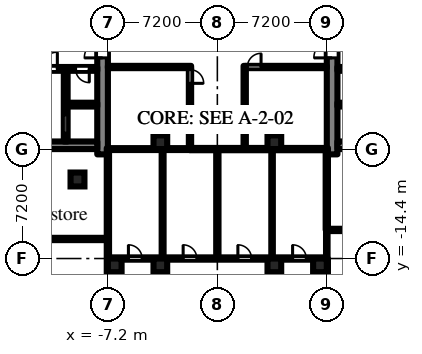
"""IFC4 building model, lengths in metres.
Left out: names, types, materials, properties, quantities, classifications, styles, units other than length and angle.
Written with IfcOpenShell. Run it as: python <this file> out.ifc"""

import sys

from ifc_helpers import new_model, si_unit, direction, frame, frame_2d, origin, origin_2d, place, context, subcontext, project, spatial, rectangle, hollow_circle, extrude, element, fill, save


model = new_model("IFC4")
c1 = context("Model", 3, precision=1e-05, world=origin(), true_north=direction((0.0, 1.0)))
c2 = subcontext(c1, "Body", "Model", "MODEL_VIEW")
j1 = project(units=[si_unit("LENGTHUNIT", "METRE"), si_unit("PLANEANGLEUNIT", "RADIAN")], contexts=[c1])
p1 = place(None, origin())
s1 = spatial("IfcSite", under=j1, at=p1, CompositionType="ELEMENT")
p2 = place(p1, origin())
s2 = spatial("IfcBuilding", under=s1, at=p2, CompositionType="ELEMENT")
p3 = place(p2, origin())
s3 = spatial("IfcBuildingStorey", under=s2, at=p3, CompositionType="ELEMENT", Elevation=0.0)
for number, where, z_axis, x_axis in (
    (1, (-6.75, -14.85, 0.0), (0.0, 0.0, 1.0), (1.0, 0.0, 0.0)),
    (2, (-3.75, -14.85, 0.0), (0.0, 0.0, 1.0), (1.0, 0.0, 0.0)),
    (3, (-3.75, -6.75, 0.0), (0.0, 0.0, 1.0), (1.0, 0.0, 0.0)),
    (4, (3.75, -14.85, 0.0), (0.0, 0.0, 1.0), (1.0, 0.0, 0.0)),
    (5, (3.75, -6.75, 0.0), (0.0, 0.0, 1.0), (1.0, 0.0, 0.0)),
    (6, (6.75, -14.85, 0.0), (0.0, 0.0, 1.0), (1.0, 0.0, 0.0)),
):
    element("IfcColumn", number, at=place(p3, frame(where, z_axis=z_axis, x_axis=x_axis)), inside=s3, PredefinedType="COLUMN", context=c2, shape_type="SweptSolid", body=[
        extrude(rectangle(XDim=0.9, YDim=0.9, at=origin_2d()), origin(), (0.0, 0.0, 1.0), 7.2),
    ])
p4 = place(p3, frame((-9.2, -9.2, 0.0), z_axis=(0.0, 0.0, 1.0), x_axis=(1.0, 0.0, 0.0)))
e7 = element("IfcColumn", 7, at=p4, inside=s3, PredefinedType="COLUMN", context=c2, shape_type="SweptSolid", body=[
    extrude(hollow_circle(Radius=0.457, WallThickness=0.05, at=origin_2d()), origin(), (0.0, 0.0, 1.0), 7.5),
])
p5 = place(p3, frame((7.55, -7.548, 0.0), z_axis=(0.0, 0.0, 1.0), x_axis=(0.0, 1.0, 0.0)))
e8 = element("IfcWall", 8, at=p5, inside=s3, PredefinedType="SHEAR", context=c2, shape_type="SweptSolid", body=[
    extrude(rectangle(XDim=15.096, YDim=0.7, at=frame_2d((7.548, 0.0))), origin(), (0.0, 0.0, 1.0), 6.6),
])
p6 = place(p5, frame((6.348, 0.0, 0.0)))
e9 = element("IfcOpeningElement", 9, at=p6, cuts=e8, PredefinedType="OPENING", context=c2, shape_type="SweptSolid", body=[
    extrude(rectangle(XDim=2.4, YDim=2.2, at=frame_2d((1.2, 1.1))), frame((0.0, 0.36, 0.0), z_axis=(0.0, -1.0, 0.0), x_axis=(1.0, 0.0, 0.0)), (0.0, 0.0, 1.0), 0.72),
])
p7 = place(p3, frame((7.9, -6.95, 0.0), z_axis=(0.0, 0.0, 1.0), x_axis=(1.0, 0.0, 0.0)))
e10 = element("IfcWall", 10, at=p7, inside=s3, PredefinedType="SHEAR", context=c2, shape_type="SweptSolid", body=[
    extrude(rectangle(XDim=12.95, YDim=0.5, at=frame_2d((6.475, 0.0))), origin(), (0.0, 0.0, 1.0), 6.6),
])
p8 = place(p7, frame((5.35, 0.0, 0.0)))
e11 = element("IfcOpeningElement", 11, at=p8, cuts=e10, PredefinedType="OPENING", context=c2, shape_type="SweptSolid", body=[
    extrude(rectangle(XDim=1.1, YDim=2.1, at=frame_2d((0.55, 1.05))), frame((0.0, 0.26, 0.0), z_axis=(0.0, -1.0, 0.0), x_axis=(1.0, 0.0, 0.0)), (0.0, 0.0, 1.0), 0.52),
])
p9 = place(p3, frame((7.9, -1.925, 0.0), z_axis=(0.0, 0.0, 1.0), x_axis=(1.0, 0.0, 0.0)))
e12 = element("IfcWall", 12, at=p9, inside=s3, PredefinedType="SHEAR", context=c2, shape_type="SweptSolid", body=[
    extrude(rectangle(XDim=12.95, YDim=0.25, at=frame_2d((6.475, 0.0))), origin(), (0.0, 0.0, 1.0), 6.6),
])
p10 = place(p9, frame((4.825, 0.0, 0.0)))
e13 = element("IfcOpeningElement", 13, at=p10, cuts=e12, PredefinedType="OPENING", context=c2, shape_type="SweptSolid", body=[
    extrude(rectangle(XDim=1.1, YDim=2.1, at=frame_2d((0.55, 1.05))), frame((0.0, 0.135, 0.0), z_axis=(0.0, -1.0, 0.0), x_axis=(1.0, 0.0, 0.0)), (0.0, 0.0, 1.0), 0.27),
])
p11 = place(p9, frame((7.025, 0.0, 0.0)))
e14 = element("IfcOpeningElement", 14, at=p11, cuts=e12, PredefinedType="OPENING", context=c2, shape_type="SweptSolid", body=[
    extrude(rectangle(XDim=1.1, YDim=2.1, at=frame_2d((0.55, 1.05))), frame((0.0, 0.135, 0.0), z_axis=(0.0, -1.0, 0.0), x_axis=(1.0, 0.0, 0.0)), (0.0, 0.0, 1.0), 0.27),
])
p12 = place(p9, frame((9.225, 0.0, 0.0)))
e15 = element("IfcOpeningElement", 15, at=p12, cuts=e12, PredefinedType="OPENING", context=c2, shape_type="SweptSolid", body=[
    extrude(rectangle(XDim=1.1, YDim=2.1, at=frame_2d((0.55, 1.05))), frame((0.0, 0.135, 0.0), z_axis=(0.0, -1.0, 0.0), x_axis=(1.0, 0.0, 0.0)), (0.0, 0.0, 1.0), 0.27),
])
p13 = place(p9, frame((11.425, 0.0, 0.0)))
e16 = element("IfcOpeningElement", 16, at=p13, cuts=e12, PredefinedType="OPENING", context=c2, shape_type="SweptSolid", body=[
    extrude(rectangle(XDim=1.1, YDim=2.1, at=frame_2d((0.55, 1.05))), frame((0.0, 0.135, 0.0), z_axis=(0.0, -1.0, 0.0), x_axis=(1.0, 0.0, 0.0)), (0.0, 0.0, 1.0), 0.27),
])
p14 = place(p9, frame((0.525, 0.0, 0.0)))
e17 = element("IfcOpeningElement", 17, at=p14, cuts=e12, PredefinedType="OPENING", context=c2, shape_type="SweptSolid", body=[
    extrude(rectangle(XDim=0.9, YDim=2.1, at=frame_2d((0.45, 1.05))), frame((0.0, 0.135, 0.0), z_axis=(0.0, -1.0, 0.0), x_axis=(1.0, 0.0, 0.0)), (0.0, 0.0, 1.0), 0.27),
])
p15 = place(p9, frame((2.625, 0.0, 0.0)))
e18 = element("IfcOpeningElement", 18, at=p15, cuts=e12, PredefinedType="OPENING", context=c2, shape_type="SweptSolid", body=[
    extrude(rectangle(XDim=1.1, YDim=2.1, at=frame_2d((0.55, 1.05))), frame((0.0, 0.135, 0.0), z_axis=(0.0, -1.0, 0.0), x_axis=(1.0, 0.0, 0.0)), (0.0, 0.0, 1.0), 0.27),
])
p16 = place(p3, frame((7.9, -4.275, 0.0), z_axis=(0.0, 0.0, 1.0), x_axis=(1.0, 0.0, 0.0)))
e19 = element("IfcWall", 19, at=p16, inside=s3, PredefinedType="SHEAR", context=c2, shape_type="SweptSolid", body=[
    extrude(rectangle(XDim=1.95, YDim=0.25, at=frame_2d((0.975, 0.0))), origin(), (0.0, 0.0, 1.0), 6.6),
])
p17 = place(p3, frame((-7.55, -7.548, 0.0), z_axis=(0.0, 0.0, 1.0), x_axis=(0.0, 1.0, 0.0)))
e20 = element("IfcWall", 20, at=p17, inside=s3, PredefinedType="SHEAR", context=c2, shape_type="SweptSolid", body=[
    extrude(rectangle(XDim=15.096, YDim=0.7, at=frame_2d((7.548, 0.0))), origin(), (0.0, 0.0, 1.0), 6.6),
])
p18 = place(p17, frame((6.348, 0.0, 0.0)))
e21 = element("IfcOpeningElement", 21, at=p18, cuts=e20, PredefinedType="OPENING", context=c2, shape_type="SweptSolid", body=[
    extrude(rectangle(XDim=2.4, YDim=2.2, at=frame_2d((1.2, 1.1))), frame((0.0, 0.36, 0.0), z_axis=(0.0, -1.0, 0.0), x_axis=(1.0, 0.0, 0.0)), (0.0, 0.0, 1.0), 0.72),
])
p19 = place(p3, frame((-7.9, -6.95, 0.0), z_axis=(0.0, 0.0, 1.0), x_axis=(-1.0, 0.0, 0.0)))
e22 = element("IfcWall", 22, at=p19, inside=s3, PredefinedType="SHEAR", context=c2, shape_type="SweptSolid", body=[
    extrude(rectangle(XDim=12.95, YDim=0.5, at=frame_2d((6.475, 0.0))), origin(), (0.0, 0.0, 1.0), 6.6),
])
p20 = place(p19, frame((5.35, 0.0, 0.0)))
e23 = element("IfcOpeningElement", 23, at=p20, cuts=e22, PredefinedType="OPENING", context=c2, shape_type="SweptSolid", body=[
    extrude(rectangle(XDim=1.1, YDim=2.1, at=frame_2d((0.55, 1.05))), frame((0.0, 0.26, 0.0), z_axis=(0.0, -1.0, 0.0), x_axis=(1.0, 0.0, 0.0)), (0.0, 0.0, 1.0), 0.52),
])
p21 = place(p3, frame((-7.9, -1.925, 0.0), z_axis=(0.0, 0.0, 1.0), x_axis=(-1.0, 0.0, 0.0)))
e24 = element("IfcWall", 24, at=p21, inside=s3, PredefinedType="SHEAR", context=c2, shape_type="SweptSolid", body=[
    extrude(rectangle(XDim=12.95, YDim=0.25, at=frame_2d((6.475, 0.0))), origin(), (0.0, 0.0, 1.0), 6.6),
])
p22 = place(p21, frame((4.825, 0.0, 0.0)))
e25 = element("IfcOpeningElement", 25, at=p22, cuts=e24, PredefinedType="OPENING", context=c2, shape_type="SweptSolid", body=[
    extrude(rectangle(XDim=1.1, YDim=2.1, at=frame_2d((0.55, 1.05))), frame((0.0, 0.135, 0.0), z_axis=(0.0, -1.0, 0.0), x_axis=(1.0, 0.0, 0.0)), (0.0, 0.0, 1.0), 0.27),
])
p23 = place(p21, frame((7.025, 0.0, 0.0)))
e26 = element("IfcOpeningElement", 26, at=p23, cuts=e24, PredefinedType="OPENING", context=c2, shape_type="SweptSolid", body=[
    extrude(rectangle(XDim=1.1, YDim=2.1, at=frame_2d((0.55, 1.05))), frame((0.0, 0.135, 0.0), z_axis=(0.0, -1.0, 0.0), x_axis=(1.0, 0.0, 0.0)), (0.0, 0.0, 1.0), 0.27),
])
p24 = place(p21, frame((9.225, 0.0, 0.0)))
e27 = element("IfcOpeningElement", 27, at=p24, cuts=e24, PredefinedType="OPENING", context=c2, shape_type="SweptSolid", body=[
    extrude(rectangle(XDim=1.1, YDim=2.1, at=frame_2d((0.55, 1.05))), frame((0.0, 0.135, 0.0), z_axis=(0.0, -1.0, 0.0), x_axis=(1.0, 0.0, 0.0)), (0.0, 0.0, 1.0), 0.27),
])
p25 = place(p21, frame((11.425, 0.0, 0.0)))
e28 = element("IfcOpeningElement", 28, at=p25, cuts=e24, PredefinedType="OPENING", context=c2, shape_type="SweptSolid", body=[
    extrude(rectangle(XDim=1.1, YDim=2.1, at=frame_2d((0.55, 1.05))), frame((0.0, 0.135, 0.0), z_axis=(0.0, -1.0, 0.0), x_axis=(1.0, 0.0, 0.0)), (0.0, 0.0, 1.0), 0.27),
])
p26 = place(p21, frame((0.525, 0.0, 0.0)))
e29 = element("IfcOpeningElement", 29, at=p26, cuts=e24, PredefinedType="OPENING", context=c2, shape_type="SweptSolid", body=[
    extrude(rectangle(XDim=0.9, YDim=2.1, at=frame_2d((0.45, 1.05))), frame((0.0, 0.135, 0.0), z_axis=(0.0, -1.0, 0.0), x_axis=(1.0, 0.0, 0.0)), (0.0, 0.0, 1.0), 0.27),
])
p27 = place(p21, frame((2.625, 0.0, 0.0)))
e30 = element("IfcOpeningElement", 30, at=p27, cuts=e24, PredefinedType="OPENING", context=c2, shape_type="SweptSolid", body=[
    extrude(rectangle(XDim=1.1, YDim=2.1, at=frame_2d((0.55, 1.05))), frame((0.0, 0.135, 0.0), z_axis=(0.0, -1.0, 0.0), x_axis=(1.0, 0.0, 0.0)), (0.0, 0.0, 1.0), 0.27),
])
p28 = place(p3, frame((-7.9, -4.275, 0.0), z_axis=(0.0, 0.0, 1.0), x_axis=(-1.0, 0.0, 0.0)))
e31 = element("IfcWall", 31, at=p28, inside=s3, PredefinedType="SHEAR", context=c2, shape_type="SweptSolid", body=[
    extrude(rectangle(XDim=1.95, YDim=0.25, at=frame_2d((0.975, 0.0))), origin(), (0.0, 0.0, 1.0), 6.6),
])
p29 = place(p3, frame((-9.975, -2.05, 0.0), z_axis=(0.0, 0.0, 1.0), x_axis=(0.0, -1.0, 0.0)))
e32 = element("IfcWall", 32, at=p29, inside=s3, PredefinedType="SHEAR", context=c2, shape_type="SweptSolid", body=[
    extrude(rectangle(XDim=4.65, YDim=0.25, at=frame_2d((2.325, 0.0))), origin(), (0.0, 0.0, 1.0), 6.6),
])
p30 = place(p29, frame((2.95, 0.0, 0.0)))
e33 = element("IfcOpeningElement", 33, at=p30, cuts=e32, PredefinedType="OPENING", context=c2, shape_type="SweptSolid", body=[
    extrude(rectangle(XDim=1.1, YDim=2.1, at=frame_2d((0.55, 1.05))), frame((0.0, 0.135, 0.0), z_axis=(0.0, -1.0, 0.0), x_axis=(1.0, 0.0, 0.0)), (0.0, 0.0, 1.0), 0.27),
])
p31 = place(p3, frame((-16.125, -13.114, 0.0), z_axis=(0.0, 0.0, 1.0), x_axis=(1.0, 0.0, 0.0)))
e34 = element("IfcWall", 34, at=p31, inside=s3, PredefinedType="PARTITIONING", context=c2, shape_type="SweptSolid", body=[
    extrude(rectangle(XDim=8.85, YDim=0.15, at=frame_2d((4.425, 0.0))), origin(), (0.0, 0.0, 1.0), 6.6),
])
p32 = place(p3, frame((-7.2, -31.125, 0.0), z_axis=(0.0, 0.0, 1.0), x_axis=(0.0, 1.0, 0.0)))
e35 = element("IfcWall", 35, at=p32, inside=s3, PredefinedType="PARTITIONING", context=c2, shape_type="SweptSolid", body=[
    extrude(rectangle(XDim=23.988, YDim=0.15, at=frame_2d((11.994, 0.0))), origin(), (0.0, 0.0, 1.0), 6.3),
])
p33 = place(p32, frame((12.025, 0.0, 0.0)))
e36 = element("IfcOpeningElement", 36, at=p33, cuts=e35, PredefinedType="OPENING", context=c2, shape_type="SweptSolid", body=[
    extrude(rectangle(XDim=1.0, YDim=2.1, at=frame_2d((0.5, 1.05))), frame((0.0, 0.085, 0.0), z_axis=(0.0, -1.0, 0.0), x_axis=(1.0, 0.0, 0.0)), (0.0, 0.0, 1.0), 0.17),
])
p34 = place(p32, frame((6.767, 0.0, 0.0)))
e37 = element("IfcOpeningElement", 37, at=p34, cuts=e35, PredefinedType="OPENING", context=c2, shape_type="SweptSolid", body=[
    extrude(rectangle(XDim=1.8, YDim=2.1, at=frame_2d((0.9, 1.05))), frame((0.0, 0.085, 0.0), z_axis=(0.0, -1.0, 0.0), x_axis=(1.0, 0.0, 0.0)), (0.0, 0.0, 1.0), 0.17),
])
p35 = place(p3, frame((-7.125, -14.4, 0.0), z_axis=(0.0, 0.0, 1.0), x_axis=(1.0, 0.0, 0.0)))
e38 = element("IfcWall", 38, at=p35, inside=s3, PredefinedType="PARTITIONING", context=c2, shape_type="SweptSolid", body=[
    extrude(rectangle(XDim=14.25, YDim=0.15, at=frame_2d((7.125, 0.0))), origin(), (0.0, 0.0, 1.0), 6.6),
])
p36 = place(p35, frame((1.275, 0.0, 0.0)))
e39 = element("IfcOpeningElement", 39, at=p36, cuts=e38, PredefinedType="OPENING", context=c2, shape_type="SweptSolid", body=[
    extrude(rectangle(XDim=0.9, YDim=2.1, at=frame_2d((0.45, 1.05))), frame((0.0, 0.085, 0.0), z_axis=(0.0, -1.0, 0.0), x_axis=(1.0, 0.0, 0.0)), (0.0, 0.0, 1.0), 0.17),
])
p37 = place(p35, frame((4.875, 0.0, 0.0)))
e40 = element("IfcOpeningElement", 40, at=p37, cuts=e38, PredefinedType="OPENING", context=c2, shape_type="SweptSolid", body=[
    extrude(rectangle(XDim=0.9, YDim=2.1, at=frame_2d((0.45, 1.05))), frame((0.0, 0.085, 0.0), z_axis=(0.0, -1.0, 0.0), x_axis=(1.0, 0.0, 0.0)), (0.0, 0.0, 1.0), 0.17),
])
p38 = place(p35, frame((8.475, 0.0, 0.0)))
e41 = element("IfcOpeningElement", 41, at=p38, cuts=e38, PredefinedType="OPENING", context=c2, shape_type="SweptSolid", body=[
    extrude(rectangle(XDim=0.9, YDim=2.1, at=frame_2d((0.45, 1.05))), frame((0.0, 0.085, 0.0), z_axis=(0.0, -1.0, 0.0), x_axis=(1.0, 0.0, 0.0)), (0.0, 0.0, 1.0), 0.17),
])
p39 = place(p35, frame((12.075, 0.0, 0.0)))
e42 = element("IfcOpeningElement", 42, at=p39, cuts=e38, PredefinedType="OPENING", context=c2, shape_type="SweptSolid", body=[
    extrude(rectangle(XDim=0.9, YDim=2.1, at=frame_2d((0.45, 1.05))), frame((0.0, 0.085, 0.0), z_axis=(0.0, -1.0, 0.0), x_axis=(1.0, 0.0, 0.0)), (0.0, 0.0, 1.0), 0.17),
])
p40 = place(p3, frame((-7.125, -7.2, 0.0), z_axis=(0.0, 0.0, 1.0), x_axis=(1.0, 0.0, 0.0)))
e43 = element("IfcWall", 43, at=p40, inside=s3, PredefinedType="PARTITIONING", context=c2, shape_type="SweptSolid", body=[
    extrude(rectangle(XDim=5.325, YDim=0.125, at=frame_2d((2.663, 0.0))), origin(), (0.0, 0.0, 1.0), 6.6),
])
p41 = place(p3, frame((-7.2, -1.8, 0.0), z_axis=(0.0, 0.0, 1.0), x_axis=(1.0, 0.0, 0.0)))
e44 = element("IfcWall", 44, at=p41, inside=s3, PredefinedType="PARTITIONING", context=c2, shape_type="SweptSolid", body=[
    extrude(rectangle(XDim=5.475, YDim=0.15, at=frame_2d((2.737, 0.0))), origin(), (0.0, 0.0, 1.0), 6.6),
])
p42 = place(p3, frame((-3.6, -14.325, 0.0), z_axis=(0.0, 0.0, 1.0), x_axis=(0.0, 1.0, 0.0)))
e45 = element("IfcWall", 45, at=p42, inside=s3, PredefinedType="PARTITIONING", context=c2, shape_type="SweptSolid", body=[
    extrude(rectangle(XDim=7.062, YDim=0.125, at=frame_2d((3.531, 0.0))), origin(), (0.0, 0.0, 1.0), 6.6),
])
p43 = place(p3, frame((-1.8, -7.125, 0.0), z_axis=(0.0, 0.0, 1.0), x_axis=(0.0, 1.0, 0.0)))
e46 = element("IfcWall", 46, at=p43, inside=s3, PredefinedType="PARTITIONING", context=c2, shape_type="SweptSolid", body=[
    extrude(rectangle(XDim=5.25, YDim=0.15, at=frame_2d((2.625, 0.0))), origin(), (0.0, 0.0, 1.0), 6.6),
])
p44 = place(p43, frame((4.25, 0.0, 0.0)))
e47 = element("IfcOpeningElement", 47, at=p44, cuts=e46, PredefinedType="OPENING", context=c2, shape_type="SweptSolid", body=[
    extrude(rectangle(XDim=0.9, YDim=2.1, at=frame_2d((0.45, 1.05))), frame((0.0, 0.085, 0.0), z_axis=(0.0, -1.0, 0.0), x_axis=(1.0, 0.0, 0.0)), (0.0, 0.0, 1.0), 0.17),
])
p45 = place(p3, frame((-1.8, -7.2, 0.0), z_axis=(0.0, 0.0, 1.0), x_axis=(1.0, 0.0, 0.0)))
e48 = element("IfcWall", 48, at=p45, inside=s3, PredefinedType="PARTITIONING", context=c2, shape_type="SweptSolid", body=[
    extrude(rectangle(XDim=8.925, YDim=0.15, at=frame_2d((4.462, 0.0))), origin(), (0.0, 0.0, 1.0), 6.6),
])
p46 = place(p3, frame((0.0, -14.325, 0.0), z_axis=(0.0, 0.0, 1.0), x_axis=(0.0, 1.0, 0.0)))
e49 = element("IfcWall", 49, at=p46, inside=s3, PredefinedType="PARTITIONING", context=c2, shape_type="SweptSolid", body=[
    extrude(rectangle(XDim=7.05, YDim=0.15, at=frame_2d((3.525, 0.0))), origin(), (0.0, 0.0, 1.0), 6.6),
])
p47 = place(p3, frame((1.8, -7.125, 0.0), z_axis=(0.0, 0.0, 1.0), x_axis=(0.0, 1.0, 0.0)))
e50 = element("IfcWall", 50, at=p47, inside=s3, PredefinedType="PARTITIONING", context=c2, shape_type="SweptSolid", body=[
    extrude(rectangle(XDim=5.4, YDim=0.15, at=frame_2d((2.7, 0.0))), origin(), (0.0, 0.0, 1.0), 6.6),
])
p48 = place(p3, frame((1.875, -1.8, 0.0), z_axis=(0.0, 0.0, 1.0), x_axis=(1.0, 0.0, 0.0)))
e51 = element("IfcWall", 51, at=p48, inside=s3, PredefinedType="PARTITIONING", context=c2, shape_type="SweptSolid", body=[
    extrude(rectangle(XDim=5.325, YDim=0.15, at=frame_2d((2.663, 0.0))), origin(), (0.0, 0.0, 1.0), 6.6),
])
p49 = place(p48, frame((0.1, 0.0, 0.0)))
e52 = element("IfcOpeningElement", 52, at=p49, cuts=e51, PredefinedType="OPENING", context=c2, shape_type="SweptSolid", body=[
    extrude(rectangle(XDim=0.9, YDim=2.1, at=frame_2d((0.45, 1.05))), frame((0.0, 0.085, 0.0), z_axis=(0.0, -1.0, 0.0), x_axis=(1.0, 0.0, 0.0)), (0.0, 0.0, 1.0), 0.17),
])
p50 = place(p3, frame((3.6, -14.325, 0.0), z_axis=(0.0, 0.0, 1.0), x_axis=(0.0, 1.0, 0.0)))
e53 = element("IfcWall", 53, at=p50, inside=s3, PredefinedType="PARTITIONING", context=c2, shape_type="SweptSolid", body=[
    extrude(rectangle(XDim=7.05, YDim=0.1, at=frame_2d((3.525, 0.0))), origin(), (0.0, 0.0, 1.0), 6.6),
])
p51 = place(p3, frame((7.2, -31.125, 0.0), z_axis=(0.0, 0.0, 1.0), x_axis=(0.0, 1.0, 0.0)))
e54 = element("IfcWall", 54, at=p51, inside=s3, PredefinedType="PARTITIONING", context=c2, shape_type="SweptSolid", body=[
    extrude(rectangle(XDim=16.725, YDim=0.15, at=frame_2d((8.363, 0.0))), origin(), (0.0, 0.0, 1.0), 6.3),
])
p52 = place(p51, frame((12.025, 0.0, 0.0)))
e55 = element("IfcOpeningElement", 55, at=p52, cuts=e54, PredefinedType="OPENING", context=c2, shape_type="SweptSolid", body=[
    extrude(rectangle(XDim=1.0, YDim=2.1, at=frame_2d((0.5, 1.05))), frame((0.0, 0.085, 0.0), z_axis=(0.0, -1.0, 0.0), x_axis=(1.0, 0.0, 0.0)), (0.0, 0.0, 1.0), 0.17),
])
p53 = place(p51, frame((7.075, 0.0, 0.0)))
e56 = element("IfcOpeningElement", 56, at=p53, cuts=e54, PredefinedType="OPENING", context=c2, shape_type="SweptSolid", body=[
    extrude(rectangle(XDim=1.2, YDim=2.1, at=frame_2d((0.6, 1.05))), frame((0.0, 0.085, 0.0), z_axis=(0.0, -1.0, 0.0), x_axis=(1.0, 0.0, 0.0)), (0.0, 0.0, 1.0), 0.17),
])
p54 = place(p3, frame((7.2, -14.4, 0.0), z_axis=(0.0, 0.0, 1.0), x_axis=(0.0, 1.0, 0.0)))
e57 = element("IfcWall", 57, at=p54, inside=s3, PredefinedType="PARTITIONING", context=c2, shape_type="SweptSolid", body=[
    extrude(rectangle(XDim=1.882, YDim=0.1, at=frame_2d((0.941, 0.0))), origin(), (0.0, 0.0, 1.0), 6.3),
])
p55 = place(p3, frame((7.2, -12.518, 0.0), z_axis=(0.0, 0.0, 1.0), x_axis=(0.0, 1.0, 0.0)))
e58 = element("IfcWall", 58, at=p55, inside=s3, PredefinedType="PARTITIONING", context=c2, shape_type="SweptSolid", body=[
    extrude(rectangle(XDim=5.393, YDim=0.15, at=frame_2d((2.697, 0.0))), origin(), (0.0, 0.0, 1.0), 6.3),
])
p56 = place(p3, frame((7.275, -12.518, 0.0), z_axis=(0.0, 0.0, 1.0), x_axis=(1.0, 0.0, 0.0)))
e59 = element("IfcWall", 59, at=p56, inside=s3, PredefinedType="PARTITIONING", context=c2, shape_type="SweptSolid", body=[
    extrude(rectangle(XDim=8.85, YDim=0.15, at=frame_2d((4.425, 0.0))), origin(), (0.0, 0.0, 1.0), 6.6),
])
p57 = place(p6, origin())
e60 = element("IfcDoor", 60, at=p57, inside=s3, OperationType="DOUBLE_DOOR_DOUBLE_SWING", PredefinedType="DOOR", context=c2, shape_type="SweptSolid", body=[
    extrude(rectangle(XDim=2.4, YDim=2.2, at=frame_2d((1.2, 1.1))), frame((0.0, 0.025, 0.0), z_axis=(0.0, -1.0, 0.0), x_axis=(1.0, 0.0, 0.0)), (0.0, 0.0, 1.0), 0.05),
])
fill(e9, e60)
p58 = place(p30, origin())
e61 = element("IfcDoor", 61, at=p58, inside=s3, OperationType="SLIDING_TO_LEFT", PredefinedType="DOOR", context=c2, shape_type="SweptSolid", body=[
    extrude(rectangle(XDim=1.1, YDim=2.1, at=frame_2d((0.55, 1.05))), frame((0.0, 0.025, 0.0), z_axis=(0.0, -1.0, 0.0), x_axis=(1.0, 0.0, 0.0)), (0.0, 0.0, 1.0), 0.05),
])
fill(e33, e61)
p59 = place(p26, origin())
e62 = element("IfcDoor", 62, at=p59, inside=s3, OperationType="SINGLE_SWING_LEFT", PredefinedType="DOOR", context=c2, shape_type="SweptSolid", body=[
    extrude(rectangle(XDim=0.9, YDim=2.1, at=frame_2d((0.45, 1.05))), frame((0.0, 0.025, 0.0), z_axis=(0.0, -1.0, 0.0), x_axis=(1.0, 0.0, 0.0)), (0.0, 0.0, 1.0), 0.05),
])
fill(e29, e62)
p60 = place(p27, frame((1.1, 0.0, 0.0), z_axis=(0.0, 0.0, 1.0), x_axis=(-1.0, 0.0, 0.0)))
e63 = element("IfcDoor", 63, at=p60, inside=s3, OperationType="SINGLE_SWING_RIGHT", PredefinedType="DOOR", context=c2, shape_type="SweptSolid", body=[
    extrude(rectangle(XDim=1.1, YDim=2.1, at=frame_2d((0.55, 1.05))), frame((0.0, 0.025, 0.0), z_axis=(0.0, -1.0, 0.0), x_axis=(1.0, 0.0, 0.0)), (0.0, 0.0, 1.0), 0.05),
])
fill(e30, e63)
p61 = place(p18, origin())
e64 = element("IfcDoor", 64, at=p61, inside=s3, OperationType="DOUBLE_DOOR_DOUBLE_SWING", PredefinedType="DOOR", context=c2, shape_type="SweptSolid", body=[
    extrude(rectangle(XDim=2.4, YDim=2.2, at=frame_2d((1.2, 1.1))), frame((0.0, 0.025, 0.0), z_axis=(0.0, -1.0, 0.0), x_axis=(1.0, 0.0, 0.0)), (0.0, 0.0, 1.0), 0.05),
])
fill(e21, e64)
p62 = place(p44, frame((0.9, 0.0, 0.0), z_axis=(0.0, 0.0, 1.0), x_axis=(-1.0, 0.0, 0.0)))
e65 = element("IfcDoor", 65, at=p62, inside=s3, OperationType="SINGLE_SWING_RIGHT", PredefinedType="DOOR", context=c2, shape_type="SweptSolid", body=[
    extrude(rectangle(XDim=0.9, YDim=2.1, at=frame_2d((0.45, 1.05))), frame((0.0, 0.025, 0.0), z_axis=(0.0, -1.0, 0.0), x_axis=(1.0, 0.0, 0.0)), (0.0, 0.0, 1.0), 0.05),
])
fill(e47, e65)
p63 = place(p49, origin())
e66 = element("IfcDoor", 66, at=p63, inside=s3, OperationType="SINGLE_SWING_RIGHT", PredefinedType="DOOR", context=c2, shape_type="SweptSolid", body=[
    extrude(rectangle(XDim=0.9, YDim=2.1, at=frame_2d((0.45, 1.05))), frame((0.0, 0.025, 0.0), z_axis=(0.0, -1.0, 0.0), x_axis=(1.0, 0.0, 0.0)), (0.0, 0.0, 1.0), 0.05),
])
fill(e52, e66)
p64 = place(p36, origin())
e67 = element("IfcDoor", 67, at=p64, inside=s3, OperationType="SINGLE_SWING_LEFT", PredefinedType="DOOR", context=c2, shape_type="SweptSolid", body=[
    extrude(rectangle(XDim=0.9, YDim=2.1, at=frame_2d((0.45, 1.05))), frame((0.0, 0.025, 0.0), z_axis=(0.0, -1.0, 0.0), x_axis=(1.0, 0.0, 0.0)), (0.0, 0.0, 1.0), 0.05),
])
fill(e39, e67)
p65 = place(p37, origin())
e68 = element("IfcDoor", 68, at=p65, inside=s3, OperationType="SINGLE_SWING_LEFT", PredefinedType="DOOR", context=c2, shape_type="SweptSolid", body=[
    extrude(rectangle(XDim=0.9, YDim=2.1, at=frame_2d((0.45, 1.05))), frame((0.0, 0.025, 0.0), z_axis=(0.0, -1.0, 0.0), x_axis=(1.0, 0.0, 0.0)), (0.0, 0.0, 1.0), 0.05),
])
fill(e40, e68)
p66 = place(p38, origin())
e69 = element("IfcDoor", 69, at=p66, inside=s3, OperationType="SINGLE_SWING_LEFT", PredefinedType="DOOR", context=c2, shape_type="SweptSolid", body=[
    extrude(rectangle(XDim=0.9, YDim=2.1, at=frame_2d((0.45, 1.05))), frame((0.0, 0.025, 0.0), z_axis=(0.0, -1.0, 0.0), x_axis=(1.0, 0.0, 0.0)), (0.0, 0.0, 1.0), 0.05),
])
fill(e41, e69)
p67 = place(p39, origin())
e70 = element("IfcDoor", 70, at=p67, inside=s3, OperationType="SINGLE_SWING_LEFT", PredefinedType="DOOR", context=c2, shape_type="SweptSolid", body=[
    extrude(rectangle(XDim=0.9, YDim=2.1, at=frame_2d((0.45, 1.05))), frame((0.0, 0.025, 0.0), z_axis=(0.0, -1.0, 0.0), x_axis=(1.0, 0.0, 0.0)), (0.0, 0.0, 1.0), 0.05),
])
fill(e42, e70)
save(model, sys.argv[1])
